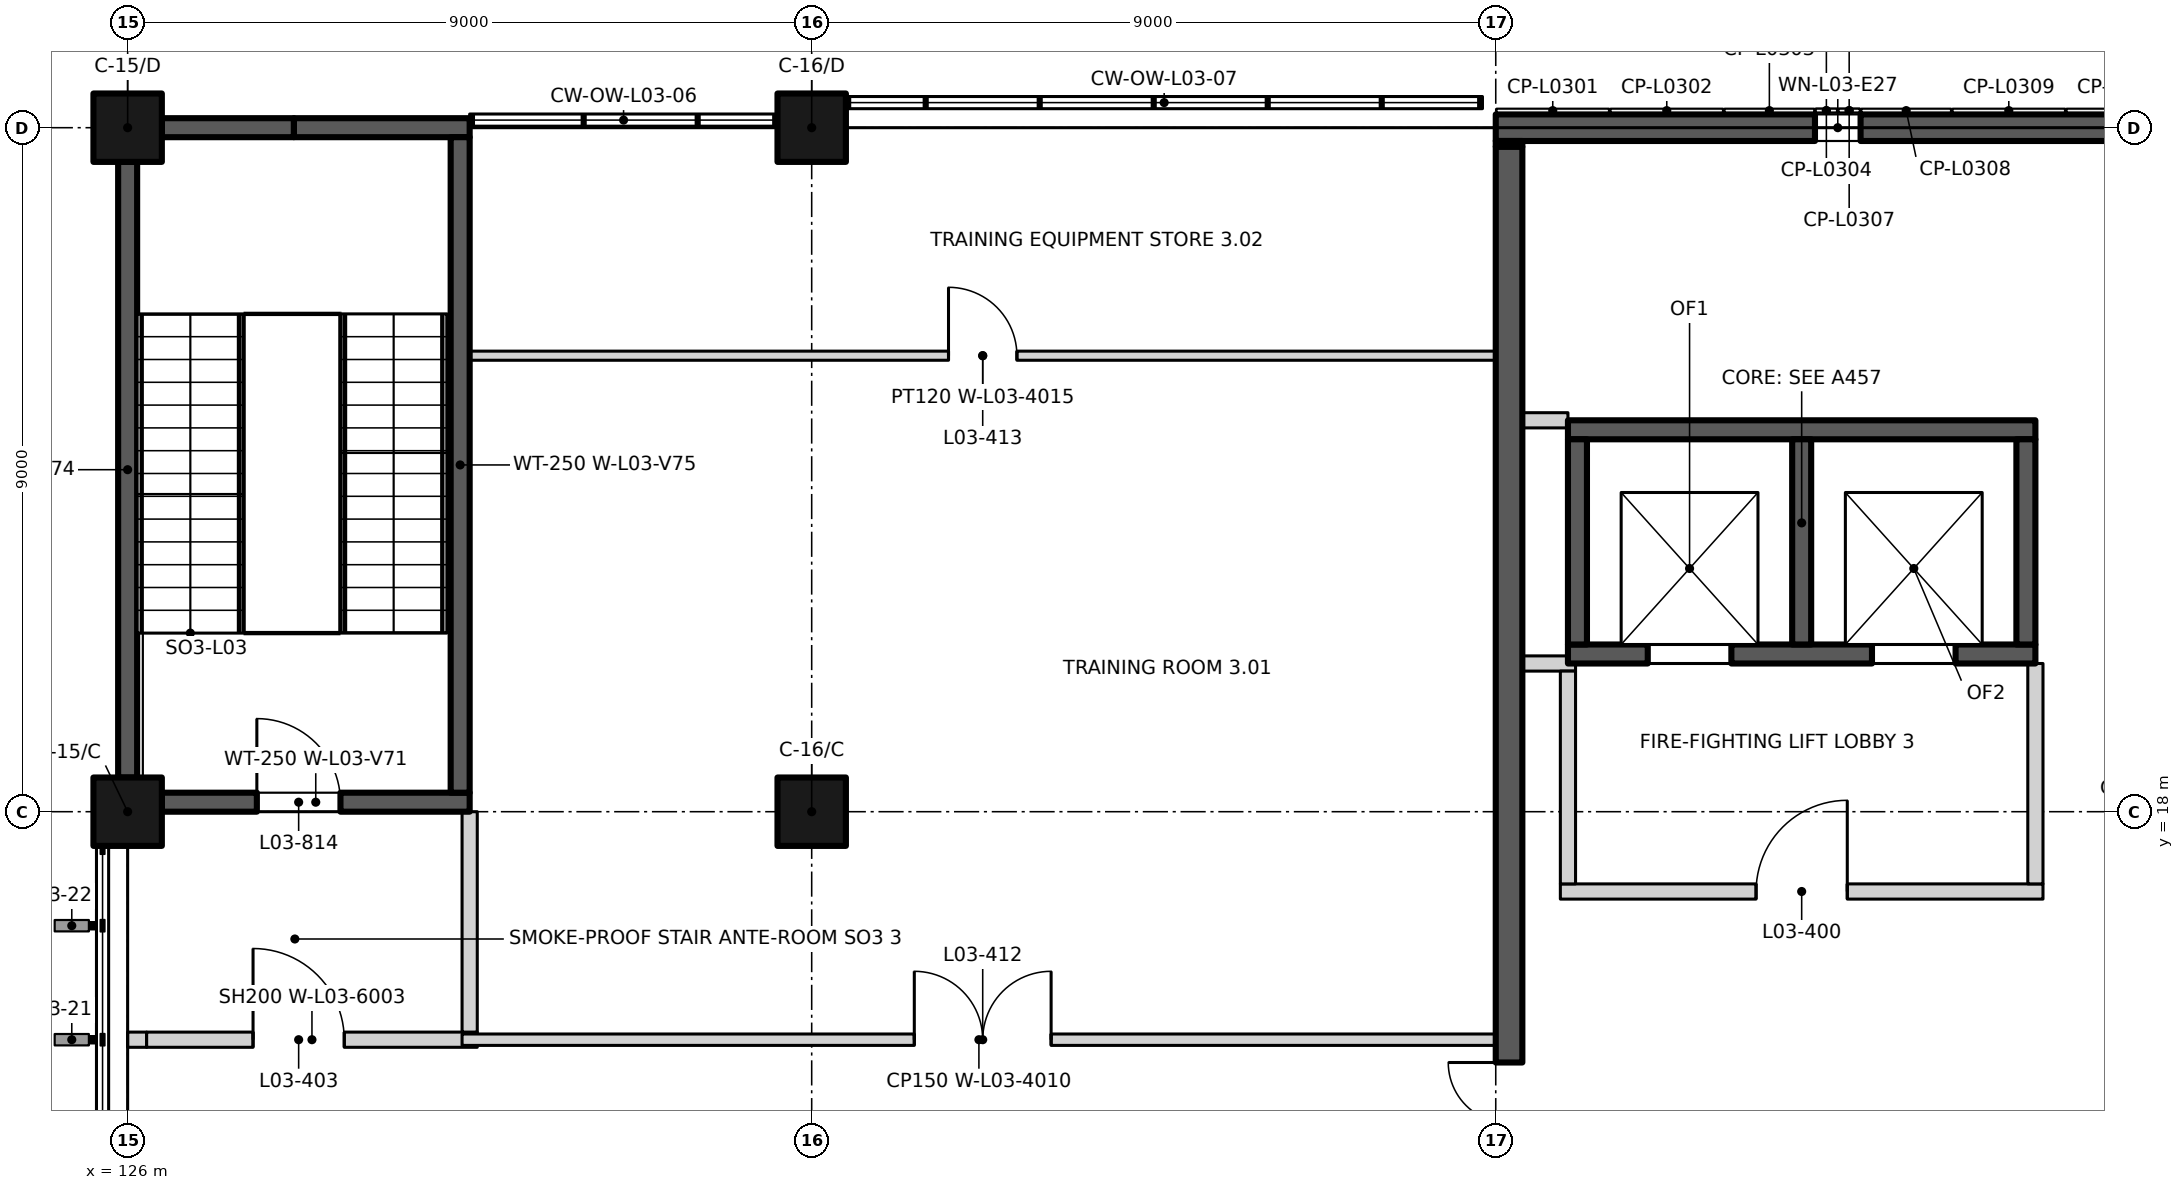
"""IFC4 building model, lengths in metres.
Left out: names, types, materials, properties, quantities, classifications, styles, units other than length and angle.
Written with IfcOpenShell. Run it as: python <this file> out.ifc"""

import sys

from ifc_helpers import new_model, si_unit, direction, frame, frame_2d, origin, origin_2d, place, context, subcontext, project, spatial, rectangle, extrude, element, fill, save


model = new_model("IFC4")
c1 = context("Model", 3, precision=1e-05, world=origin(), true_north=direction((0.0, 1.0)))
c2 = subcontext(c1, "Body", "Model", "MODEL_VIEW")
j1 = project(units=[si_unit("LENGTHUNIT", "METRE"), si_unit("PLANEANGLEUNIT", "RADIAN")], contexts=[c1])
p1 = place(None, origin())
s1 = spatial("IfcSite", under=j1, at=p1, CompositionType="ELEMENT")
p2 = place(p1, origin())
s2 = spatial("IfcBuilding", under=s1, at=p2, CompositionType="ELEMENT")
p3 = place(p2, frame((0.0, 0.0, 15.0)))
s3 = spatial("IfcBuildingStorey", under=s2, at=p3, CompositionType="ELEMENT", Elevation=15.0)
for number, where, z_axis, x_axis in (
    (1, (126.0, 18.0, 0.0), (0.0, 0.0, 1.0), (1.0, 0.0, 0.0)),
    (2, (135.0, 18.0, 0.0), (0.0, 0.0, 1.0), (1.0, 0.0, 0.0)),
    (3, (126.0, 27.0, 0.0), (0.0, 0.0, 1.0), (1.0, 0.0, 0.0)),
    (4, (135.0, 27.0, 0.0), (0.0, 0.0, 1.0), (1.0, 0.0, 0.0)),
):
    element("IfcColumn", number, at=place(p3, frame(where, z_axis=z_axis, x_axis=x_axis)), inside=s3, PredefinedType="COLUMN", context=c2, shape_type="SweptSolid", body=[
        extrude(rectangle(XDim=0.9, YDim=0.9, at=origin_2d()), origin(), (0.0, 0.0, 1.0), 4.5),
    ])
p4 = place(p3, frame((126.45, 18.125, 0.0), z_axis=(0.0, 0.0, 1.0), x_axis=(1.0, 0.0, 0.0)))
e5 = element("IfcWall", 5, at=p4, inside=s3, PredefinedType="SHEAR", context=c2, shape_type="SweptSolid", body=[
    extrude(rectangle(XDim=4.05, YDim=0.25, at=frame_2d((2.025, 0.0))), origin(), (0.0, 0.0, 1.0), 4.5),
])
p5 = place(p4, frame((1.25, 0.0, 0.0)))
e6 = element("IfcOpeningElement", 6, at=p5, cuts=e5, PredefinedType="OPENING", context=c2, shape_type="SweptSolid", body=[
    extrude(rectangle(XDim=1.1, YDim=2.1, at=frame_2d((0.55, 1.05))), frame((0.0, 0.135, 0.0), z_axis=(0.0, -1.0, 0.0), x_axis=(1.0, 0.0, 0.0)), (0.0, 0.0, 1.0), 0.27),
])
p6 = place(p3, frame((126.45, 27.0, 0.0), z_axis=(0.0, 0.0, 1.0), x_axis=(1.0, 0.0, 0.0)))
e7 = element("IfcWall", 7, at=p6, inside=s3, PredefinedType="SHEAR", context=c2, shape_type="SweptSolid", body=[
    extrude(rectangle(XDim=1.738, YDim=0.25, at=frame_2d((0.869, 0.0))), origin(), (0.0, 0.0, 1.0), 4.5),
])
p7 = place(p3, frame((128.188, 27.0, 0.0), z_axis=(0.0, 0.0, 1.0), x_axis=(1.0, 0.0, 0.0)))
e8 = element("IfcWall", 8, at=p7, inside=s3, PredefinedType="SHEAR", context=c2, shape_type="SweptSolid", body=[
    extrude(rectangle(XDim=2.312, YDim=0.25, at=frame_2d((1.156, 0.0))), origin(), (0.0, 0.0, 1.0), 4.5),
])
p8 = place(p3, frame((126.0, 18.45, 0.0), z_axis=(0.0, 0.0, 1.0), x_axis=(0.0, 1.0, 0.0)))
e9 = element("IfcWall", 9, at=p8, inside=s3, PredefinedType="SHEAR", context=c2, shape_type="SweptSolid", body=[
    extrude(rectangle(XDim=8.1, YDim=0.25, at=frame_2d((4.05, 0.0))), origin(), (0.0, 0.0, 1.0), 4.5),
])
p9 = place(p3, frame((130.375, 18.25, 0.0), z_axis=(0.0, 0.0, 1.0), x_axis=(0.0, 1.0, 0.0)))
e10 = element("IfcWall", 10, at=p9, inside=s3, PredefinedType="SHEAR", context=c2, shape_type="SweptSolid", body=[
    extrude(rectangle(XDim=8.625, YDim=0.25, at=frame_2d((4.312, 0.0))), origin(), (0.0, 0.0, 1.0), 4.5),
])
p10 = place(p3, frame((144.95, 20.075, 0.0), z_axis=(0.0, 0.0, 1.0), x_axis=(1.0, 0.0, 0.0)))
e11 = element("IfcWall", 11, at=p10, inside=s3, PredefinedType="SHEAR", context=c2, shape_type="SweptSolid", body=[
    extrude(rectangle(XDim=6.15, YDim=0.25, at=frame_2d((3.075, 0.0))), origin(), (0.0, 0.0, 1.0), 4.5),
])
p11 = place(p10, frame((1.05, 0.0, 0.0)))
e12 = element("IfcOpeningElement", 12, at=p11, cuts=e11, PredefinedType="OPENING", context=c2, shape_type="SweptSolid", body=[
    extrude(rectangle(XDim=1.1, YDim=2.1, at=frame_2d((0.55, 1.05))), frame((0.0, 0.135, 0.0), z_axis=(0.0, -1.0, 0.0), x_axis=(1.0, 0.0, 0.0)), (0.0, 0.0, 1.0), 0.27),
])
p12 = place(p10, frame((4.0, 0.0, 0.0)))
e13 = element("IfcOpeningElement", 13, at=p12, cuts=e11, PredefinedType="OPENING", context=c2, shape_type="SweptSolid", body=[
    extrude(rectangle(XDim=1.1, YDim=2.1, at=frame_2d((0.55, 1.05))), frame((0.0, 0.135, 0.0), z_axis=(0.0, -1.0, 0.0), x_axis=(1.0, 0.0, 0.0)), (0.0, 0.0, 1.0), 0.27),
])
p13 = place(p3, frame((144.95, 23.025, 0.0), z_axis=(0.0, 0.0, 1.0), x_axis=(1.0, 0.0, 0.0)))
e14 = element("IfcWall", 14, at=p13, inside=s3, PredefinedType="SHEAR", context=c2, shape_type="SweptSolid", body=[
    extrude(rectangle(XDim=6.15, YDim=0.25, at=frame_2d((3.075, 0.0))), origin(), (0.0, 0.0, 1.0), 4.5),
])
for number, where, z_axis, x_axis in (
    (15, (145.075, 20.2, 0.0), (0.0, 0.0, 1.0), (0.0, 1.0, 0.0)),
    (16, (148.025, 20.2, 0.0), (0.0, 0.0, 1.0), (0.0, 1.0, 0.0)),
    (17, (150.975, 20.2, 0.0), (0.0, 0.0, 1.0), (0.0, 1.0, 0.0)),
):
    element("IfcWall", number, at=place(p3, frame(where, z_axis=z_axis, x_axis=x_axis)), inside=s3, PredefinedType="SHEAR", context=c2, shape_type="SweptSolid", body=[
        extrude(rectangle(XDim=2.7, YDim=0.25, at=frame_2d((1.35, 0.0))), origin(), (0.0, 0.0, 1.0), 4.5),
    ])
p14 = place(p3, frame((144.0, 27.0, 0.0), z_axis=(0.0, 0.0, 1.0), x_axis=(1.0, 0.0, 0.0)))
e18 = element("IfcWall", 18, at=p14, inside=s3, PredefinedType="SOLIDWALL", context=c2, shape_type="SweptSolid", body=[
    extrude(rectangle(XDim=18.0, YDim=0.35, at=frame_2d((9.0, 0.0))), origin(), (0.0, 0.0, 1.0), 3.6),
])
p15 = place(p14, frame((4.2, 0.0, 0.6)))
e19 = element("IfcOpeningElement", 19, at=p15, cuts=e18, PredefinedType="OPENING", context=c2, shape_type="SweptSolid", body=[
    extrude(rectangle(XDim=0.6, YDim=2.4, at=frame_2d((0.3, 1.2))), frame((0.0, 0.185, 0.0), z_axis=(0.0, -1.0, 0.0), x_axis=(1.0, 0.0, 0.0)), (0.0, 0.0, 1.0), 0.37),
])
p16 = place(p14, frame((13.2, 0.0, 0.6)))
e20 = element("IfcOpeningElement", 20, at=p16, cuts=e18, PredefinedType="OPENING", context=c2, shape_type="SweptSolid", body=[
    extrude(rectangle(XDim=0.6, YDim=2.4, at=frame_2d((0.3, 1.2))), frame((0.0, 0.185, 0.0), z_axis=(0.0, -1.0, 0.0), x_axis=(1.0, 0.0, 0.0)), (0.0, 0.0, 1.0), 0.37),
])
p17 = place(p3, frame((126.0, 15.0, 0.0), z_axis=(0.0, 0.0, 1.0), x_axis=(1.0, 0.0, 0.0)))
e21 = element("IfcWall", 21, at=p17, inside=s3, PredefinedType="PARTITIONING", context=c2, shape_type="SweptSolid", body=[
    extrude(rectangle(XDim=0.25, YDim=0.2, at=frame_2d((0.125, 0.0))), origin(), (0.0, 0.0, 1.0), 3.6),
])
p18 = place(p3, frame((126.25, 15.0, 0.0), z_axis=(0.0, 0.0, 1.0), x_axis=(1.0, 0.0, 0.0)))
e22 = element("IfcWall", 22, at=p18, inside=s3, PredefinedType="PARTITIONING", context=c2, shape_type="SweptSolid", body=[
    extrude(rectangle(XDim=4.35, YDim=0.2, at=frame_2d((2.175, 0.0))), origin(), (0.0, 0.0, 1.0), 4.2),
])
p19 = place(p18, frame((1.4, 0.0, 0.0)))
e23 = element("IfcOpeningElement", 23, at=p19, cuts=e22, PredefinedType="OPENING", context=c2, shape_type="SweptSolid", body=[
    extrude(rectangle(XDim=1.2, YDim=2.1, at=frame_2d((0.6, 1.05))), frame((0.0, 0.11, 0.0), z_axis=(0.0, -1.0, 0.0), x_axis=(1.0, 0.0, 0.0)), (0.0, 0.0, 1.0), 0.22),
])
p20 = place(p3, frame((130.4, 15.0, 0.0), z_axis=(0.0, 0.0, 1.0), x_axis=(1.0, 0.0, 0.0)))
e24 = element("IfcWall", 24, at=p20, inside=s3, PredefinedType="PARTITIONING", context=c2, shape_type="SweptSolid", body=[
    extrude(rectangle(XDim=13.6, YDim=0.15, at=frame_2d((6.8, 0.0))), origin(), (0.0, 0.0, 1.0), 4.2),
])
p21 = place(p20, frame((5.95, 0.0, 0.0)))
e25 = element("IfcOpeningElement", 25, at=p21, cuts=e24, PredefinedType="OPENING", context=c2, shape_type="SweptSolid", body=[
    extrude(rectangle(XDim=1.8, YDim=2.1, at=frame_2d((0.9, 1.05))), frame((0.0, 0.085, 0.0), z_axis=(0.0, -1.0, 0.0), x_axis=(1.0, 0.0, 0.0)), (0.0, 0.0, 1.0), 0.17),
])
p22 = place(p3, frame((144.85, 16.95, 0.0), z_axis=(0.0, 0.0, 1.0), x_axis=(1.0, 0.0, 0.0)))
e26 = element("IfcWall", 26, at=p22, inside=s3, PredefinedType="PARTITIONING", context=c2, shape_type="SweptSolid", body=[
    extrude(rectangle(XDim=6.35, YDim=0.2, at=frame_2d((3.175, 0.0))), origin(), (0.0, 0.0, 1.0), 4.2),
])
p23 = place(p22, frame((2.575, 0.0, 0.0)))
e27 = element("IfcOpeningElement", 27, at=p23, cuts=e26, PredefinedType="OPENING", context=c2, shape_type="SweptSolid", body=[
    extrude(rectangle(XDim=1.2, YDim=2.1, at=frame_2d((0.6, 1.05))), frame((0.0, 0.11, 0.0), z_axis=(0.0, -1.0, 0.0), x_axis=(1.0, 0.0, 0.0)), (0.0, 0.0, 1.0), 0.22),
])
p24 = place(p3, frame((144.35, 19.95, 0.0), z_axis=(0.0, 0.0, 1.0), x_axis=(1.0, 0.0, 0.0)))
e28 = element("IfcWall", 28, at=p24, inside=s3, PredefinedType="PARTITIONING", context=c2, shape_type="SweptSolid", body=[
    extrude(rectangle(XDim=0.7, YDim=0.2, at=frame_2d((0.35, 0.0))), origin(), (0.0, 0.0, 1.0), 4.2),
])
p25 = place(p3, frame((144.35, 23.15, 0.0), z_axis=(0.0, 0.0, 1.0), x_axis=(1.0, 0.0, 0.0)))
e29 = element("IfcWall", 29, at=p25, inside=s3, PredefinedType="PARTITIONING", context=c2, shape_type="SweptSolid", body=[
    extrude(rectangle(XDim=0.6, YDim=0.2, at=frame_2d((0.3, 0.0))), origin(), (0.0, 0.0, 1.0), 4.2),
])
p26 = place(p3, frame((130.5, 24.0, 0.0), z_axis=(0.0, 0.0, 1.0), x_axis=(1.0, 0.0, 0.0)))
e30 = element("IfcWall", 30, at=p26, inside=s3, PredefinedType="PARTITIONING", context=c2, shape_type="SweptSolid", body=[
    extrude(rectangle(XDim=13.5, YDim=0.12, at=frame_2d((6.75, 0.0))), origin(), (0.0, 0.0, 1.0), 4.2),
])
p27 = place(p26, frame((6.3, 0.0, 0.0)))
e31 = element("IfcOpeningElement", 31, at=p27, cuts=e30, PredefinedType="OPENING", context=c2, shape_type="SweptSolid", body=[
    extrude(rectangle(XDim=0.9, YDim=2.1, at=frame_2d((0.45, 1.05))), frame((0.0, 0.07, 0.0), z_axis=(0.0, -1.0, 0.0), x_axis=(1.0, 0.0, 0.0)), (0.0, 0.0, 1.0), 0.14),
])
p28 = place(p3, frame((130.5, 15.1, 0.0), z_axis=(0.0, 0.0, 1.0), x_axis=(0.0, 1.0, 0.0)))
e32 = element("IfcWall", 32, at=p28, inside=s3, PredefinedType="PARTITIONING", context=c2, shape_type="SweptSolid", body=[
    extrude(rectangle(XDim=2.9, YDim=0.2, at=frame_2d((1.45, 0.0))), origin(), (0.0, 0.0, 1.0), 4.2),
])
p29 = place(p3, frame((144.175, 9.35, 0.0), z_axis=(0.0, 0.0, 1.0), x_axis=(0.0, 1.0, 0.0)))
e33 = element("IfcWall", 33, at=p29, inside=s3, PredefinedType="SHEAR", context=c2, shape_type="SweptSolid", body=[
    extrude(rectangle(XDim=17.4, YDim=0.35, at=frame_2d((8.7, 0.0))), origin(), (0.0, 0.0, 1.0), 4.2),
])
p30 = place(p29, frame((3.75, 0.0, 0.0)))
e34 = element("IfcOpeningElement", 34, at=p30, cuts=e33, PredefinedType="OPENING", context=c2, shape_type="SweptSolid", body=[
    extrude(rectangle(XDim=1.6, YDim=2.4, at=frame_2d((0.8, 1.2))), frame((0.0, 0.185, 0.0), z_axis=(0.0, -1.0, 0.0), x_axis=(1.0, 0.0, 0.0)), (0.0, 0.0, 1.0), 0.37),
])
p31 = place(p3, frame((144.175, 26.75, 0.0), z_axis=(0.0, 0.0, 1.0), x_axis=(0.0, 1.0, 0.0)))
e35 = element("IfcWall", 35, at=p31, inside=s3, PredefinedType="SHEAR", context=c2, shape_type="SweptSolid", body=[
    extrude(rectangle(XDim=0.075, YDim=0.35, at=frame_2d((0.038, 0.0))), origin(), (0.0, 0.0, 1.0), 3.6),
])
p32 = place(p3, frame((144.95, 17.05, 0.0), z_axis=(0.0, 0.0, 1.0), x_axis=(0.0, 1.0, 0.0)))
e36 = element("IfcWall", 36, at=p32, inside=s3, PredefinedType="PARTITIONING", context=c2, shape_type="SweptSolid", body=[
    extrude(rectangle(XDim=2.8, YDim=0.2, at=frame_2d((1.4, 0.0))), origin(), (0.0, 0.0, 1.0), 4.2),
])
p33 = place(p3, frame((151.1, 17.05, 0.0), z_axis=(0.0, 0.0, 1.0), x_axis=(0.0, 1.0, 0.0)))
e37 = element("IfcWall", 37, at=p33, inside=s3, PredefinedType="PARTITIONING", context=c2, shape_type="SweptSolid", body=[
    extrude(rectangle(XDim=2.9, YDim=0.2, at=frame_2d((1.45, 0.0))), origin(), (0.0, 0.0, 1.0), 4.2),
])
p34 = place(p5, origin())
e38 = element("IfcDoor", 38, at=p34, inside=s3, OperationType="SINGLE_SWING_LEFT", PredefinedType="DOOR", context=c2, shape_type="SweptSolid", body=[
    extrude(rectangle(XDim=1.1, YDim=2.1, at=frame_2d((0.55, 1.05))), frame((0.0, 0.025, 0.0), z_axis=(0.0, -1.0, 0.0), x_axis=(1.0, 0.0, 0.0)), (0.0, 0.0, 1.0), 0.05),
])
fill(e6, e38)
p35 = place(p11, origin())
e39 = element("IfcDoor", 39, at=p35, inside=s3, OperationType="DOUBLE_DOOR_SLIDING", PredefinedType="DOOR", context=c2, shape_type="SweptSolid", body=[
    extrude(rectangle(XDim=1.1, YDim=2.1, at=frame_2d((0.55, 1.05))), frame((0.0, 0.025, 0.0), z_axis=(0.0, -1.0, 0.0), x_axis=(1.0, 0.0, 0.0)), (0.0, 0.0, 1.0), 0.05),
])
fill(e12, e39)
p36 = place(p12, origin())
e40 = element("IfcDoor", 40, at=p36, inside=s3, OperationType="DOUBLE_DOOR_SLIDING", PredefinedType="DOOR", context=c2, shape_type="SweptSolid", body=[
    extrude(rectangle(XDim=1.1, YDim=2.1, at=frame_2d((0.55, 1.05))), frame((0.0, 0.025, 0.0), z_axis=(0.0, -1.0, 0.0), x_axis=(1.0, 0.0, 0.0)), (0.0, 0.0, 1.0), 0.05),
])
fill(e13, e40)
p37 = place(p15, origin())
e41 = element("IfcWindow", 41, at=p37, inside=s3, PartitioningType="SINGLE_PANEL", PredefinedType="WINDOW", context=c2, shape_type="SweptSolid", body=[
    extrude(rectangle(XDim=0.6, YDim=2.4, at=frame_2d((0.3, 1.2))), frame((0.0, -0.005, 0.0), z_axis=(0.0, -1.0, 0.0), x_axis=(1.0, 0.0, 0.0)), (0.0, 0.0, 1.0), 0.06),
])
fill(e19, e41)
p38 = place(p23, origin())
e42 = element("IfcDoor", 42, at=p38, inside=s3, OperationType="SINGLE_SWING_RIGHT", PredefinedType="DOOR", context=c2, shape_type="SweptSolid", body=[
    extrude(rectangle(XDim=1.2, YDim=2.1, at=frame_2d((0.6, 1.05))), frame((0.0, 0.025, 0.0), z_axis=(0.0, -1.0, 0.0), x_axis=(1.0, 0.0, 0.0)), (0.0, 0.0, 1.0), 0.05),
])
fill(e27, e42)
p39 = place(p19, origin())
e43 = element("IfcDoor", 43, at=p39, inside=s3, OperationType="SINGLE_SWING_LEFT", PredefinedType="DOOR", context=c2, shape_type="SweptSolid", body=[
    extrude(rectangle(XDim=1.2, YDim=2.1, at=frame_2d((0.6, 1.05))), frame((0.0, 0.025, 0.0), z_axis=(0.0, -1.0, 0.0), x_axis=(1.0, 0.0, 0.0)), (0.0, 0.0, 1.0), 0.05),
])
fill(e23, e43)
p40 = place(p30, origin())
e44 = element("IfcDoor", 44, at=p40, inside=s3, OperationType="DOUBLE_DOOR_SINGLE_SWING", PredefinedType="DOOR", context=c2, shape_type="SweptSolid", body=[
    extrude(rectangle(XDim=1.6, YDim=2.4, at=frame_2d((0.8, 1.2))), frame((0.0, 0.025, 0.0), z_axis=(0.0, -1.0, 0.0), x_axis=(1.0, 0.0, 0.0)), (0.0, 0.0, 1.0), 0.05),
])
fill(e34, e44)
p41 = place(p21, origin())
e45 = element("IfcDoor", 45, at=p41, inside=s3, OperationType="DOUBLE_DOOR_SINGLE_SWING", PredefinedType="DOOR", context=c2, shape_type="SweptSolid", body=[
    extrude(rectangle(XDim=1.8, YDim=2.1, at=frame_2d((0.9, 1.05))), frame((0.0, 0.025, 0.0), z_axis=(0.0, -1.0, 0.0), x_axis=(1.0, 0.0, 0.0)), (0.0, 0.0, 1.0), 0.05),
])
fill(e25, e45)
p42 = place(p27, origin())
e46 = element("IfcDoor", 46, at=p42, inside=s3, OperationType="SINGLE_SWING_LEFT", PredefinedType="DOOR", context=c2, shape_type="SweptSolid", body=[
    extrude(rectangle(XDim=0.9, YDim=2.1, at=frame_2d((0.45, 1.05))), frame((0.0, 0.025, 0.0), z_axis=(0.0, -1.0, 0.0), x_axis=(1.0, 0.0, 0.0)), (0.0, 0.0, 1.0), 0.05),
])
fill(e31, e46)
save(model, sys.argv[1])
